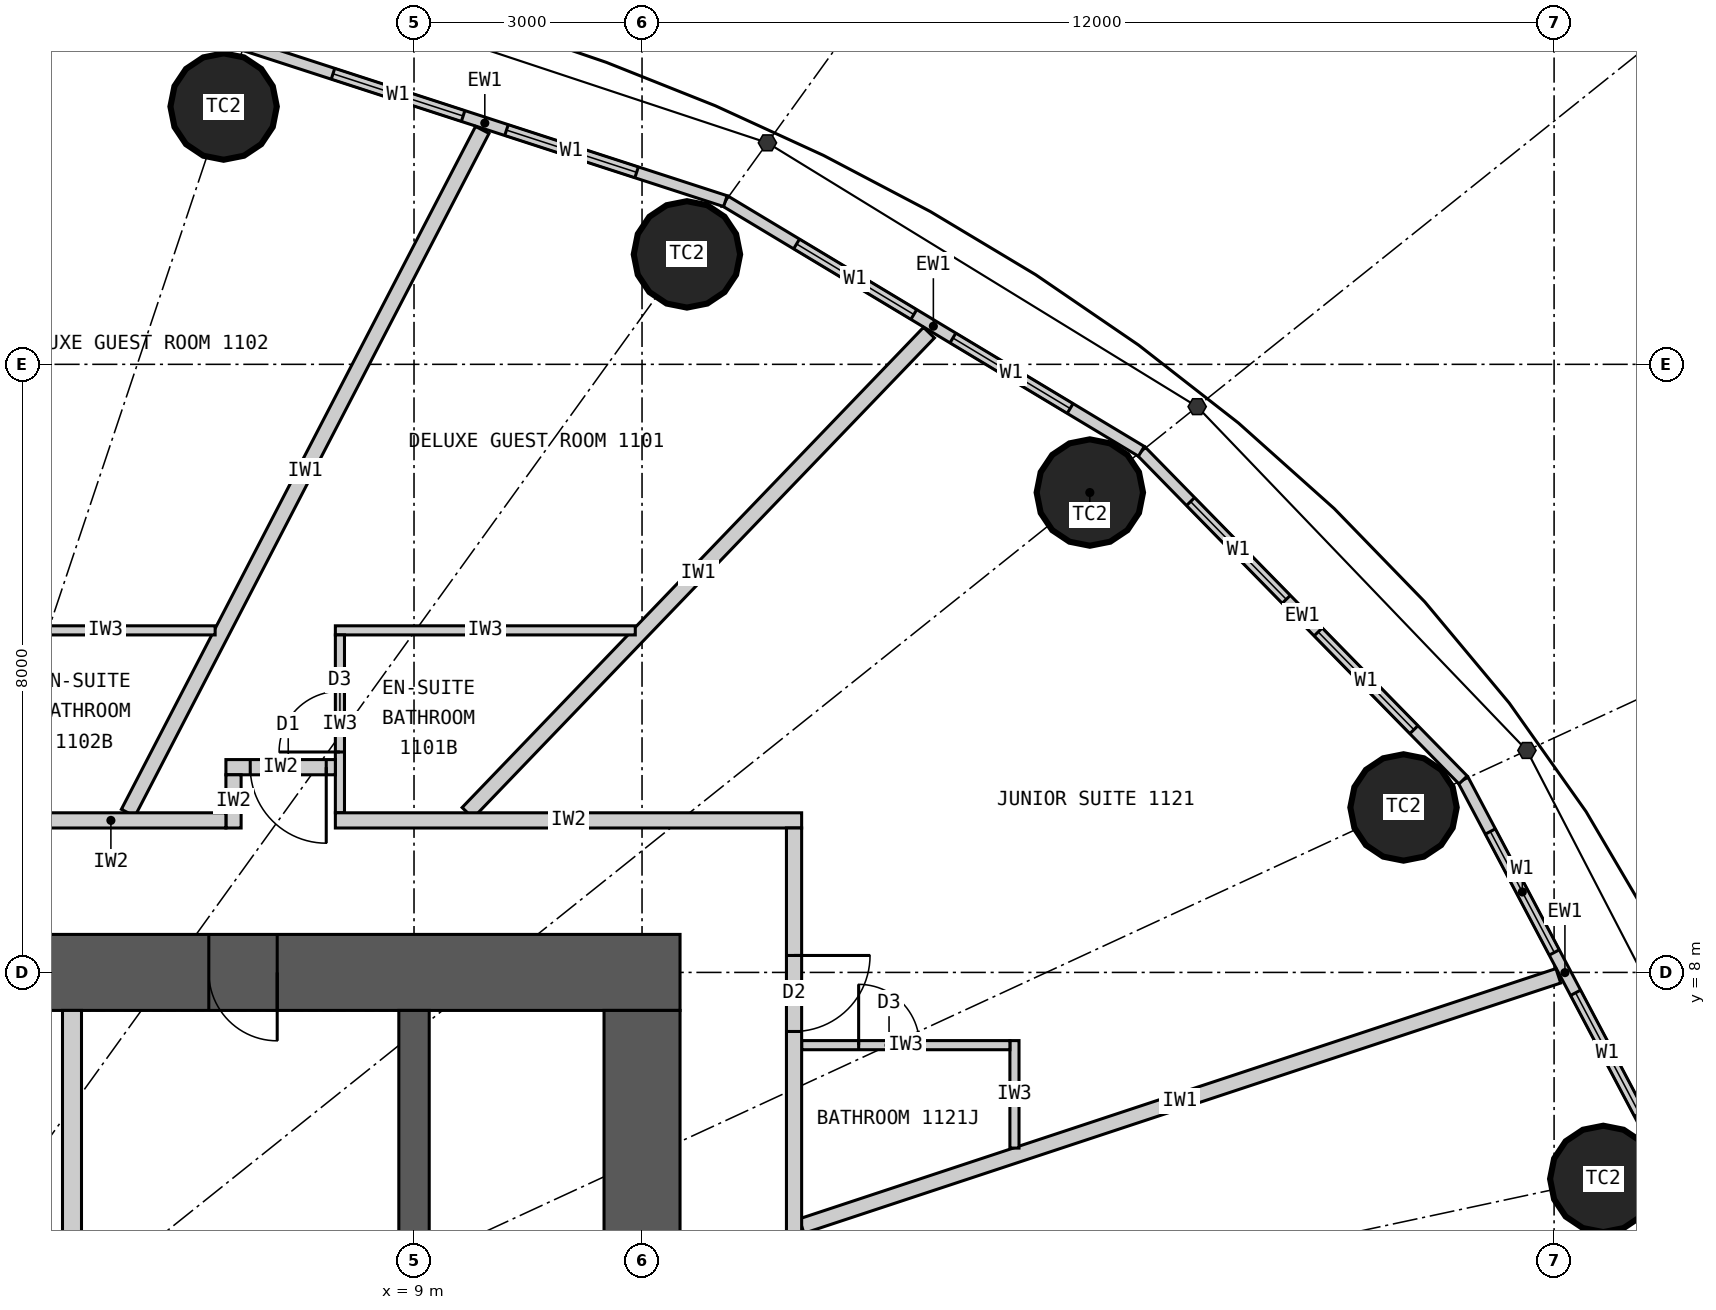
"""IFC4 building model, lengths in metres.
Left out: names, types, materials, properties, quantities, classifications, styles, units other than length and angle.
Written with IfcOpenShell. Run it as: python <this file> out.ifc"""

import sys

from ifc_helpers import new_model, si_unit, direction, frame, frame_2d, origin, origin_2d, place, context, subcontext, project, spatial, rectangle, circle, extrude, element, fill, save


model = new_model("IFC4")
c1 = context("Model", 3, precision=1e-05, world=origin(), true_north=direction((0.0, 1.0)))
c2 = subcontext(c1, "Body", "Model", "MODEL_VIEW")
j1 = project(units=[si_unit("LENGTHUNIT", "METRE"), si_unit("PLANEANGLEUNIT", "RADIAN")], contexts=[c1])
p1 = place(None, origin())
s1 = spatial("IfcSite", under=j1, at=p1, CompositionType="ELEMENT")
p2 = place(p1, origin())
s2 = spatial("IfcBuilding", under=s1, at=p2, CompositionType="ELEMENT")
p3 = place(p2, frame((0.0, 0.0, 50.7)))
s3 = spatial("IfcBuildingStorey", under=s2, at=p3, CompositionType="ELEMENT", Elevation=50.7)
for number, where, z_axis, x_axis in (
    (1, (24.647, 5.283, 0.0), (0.0, 0.0, 1.0), (1.0, 0.0, 0.0)),
    (2, (22.019, 10.17, 0.0), (0.0, 0.0, 1.0), (1.0, 0.0, 0.0)),
    (3, (17.892, 14.313, 0.0), (0.0, 0.0, 1.0), (1.0, 0.0, 0.0)),
    (4, (12.591, 17.447, 0.0), (0.0, 0.0, 1.0), (1.0, 0.0, 0.0)),
    (5, (6.495, 19.391, 0.0), (0.0, 0.0, 1.0), (1.0, 0.0, 0.0)),
):
    element("IfcColumn", number, at=place(p3, frame(where, z_axis=z_axis, x_axis=x_axis)), inside=s3, PredefinedType="COLUMN", context=c2, shape_type="SweptSolid", body=[
        extrude(circle(Radius=0.7, at=origin_2d()), origin(), (0.0, 0.0, 1.0), 3.3),
    ])
p4 = place(p3, frame((-12.5, 8.0, 0.0), z_axis=(0.0, 0.0, 1.0), x_axis=(1.0, 0.0, 0.0)))
e6 = element("IfcWall", 6, at=p4, inside=s3, PredefinedType="SHEAR", context=c2, shape_type="SweptSolid", body=[
    extrude(rectangle(XDim=25.0, YDim=1.0, at=frame_2d((12.5, 0.0))), origin(), (0.0, 0.0, 1.0), 3.3),
])
p5 = place(p4, frame((11.2, 0.0, 0.0)))
e7 = element("IfcOpeningElement", 7, at=p5, cuts=e6, PredefinedType="OPENING", context=c2, shape_type="SweptSolid", body=[
    extrude(rectangle(XDim=1.2, YDim=2.2, at=frame_2d((0.6, 1.1))), frame((0.0, 0.51, 0.0), z_axis=(0.0, -1.0, 0.0), x_axis=(1.0, 0.0, 0.0)), (0.0, 0.0, 1.0), 1.02),
])
p6 = place(p4, frame((18.8, 0.0, 0.0)))
e8 = element("IfcOpeningElement", 8, at=p6, cuts=e6, PredefinedType="OPENING", context=c2, shape_type="SweptSolid", body=[
    extrude(rectangle(XDim=0.9, YDim=2.2, at=frame_2d((0.45, 1.1))), frame((0.0, 0.51, 0.0), z_axis=(0.0, -1.0, 0.0), x_axis=(1.0, 0.0, 0.0)), (0.0, 0.0, 1.0), 1.02),
])
p7 = place(p3, frame((12.0, -7.5, 0.0), z_axis=(0.0, 0.0, 1.0), x_axis=(0.0, 1.0, 0.0)))
e9 = element("IfcWall", 9, at=p7, inside=s3, PredefinedType="SHEAR", context=c2, shape_type="SweptSolid", body=[
    extrude(rectangle(XDim=15.0, YDim=1.0, at=frame_2d((7.5, 0.0))), origin(), (0.0, 0.0, 1.0), 3.3),
])
p8 = place(p7, frame((6.6, 0.0, 0.0)))
e10 = element("IfcOpeningElement", 10, at=p8, cuts=e9, PredefinedType="OPENING", context=c2, shape_type="SweptSolid", body=[
    extrude(rectangle(XDim=1.8, YDim=2.2, at=frame_2d((0.9, 1.1))), frame((0.0, 0.51, 0.0), z_axis=(0.0, -1.0, 0.0), x_axis=(1.0, 0.0, 0.0)), (0.0, 0.0, 1.0), 1.02),
])
p9 = place(p3, frame((9.0, 4.5, 0.0), z_axis=(0.0, 0.0, 1.0), x_axis=(0.0, 1.0, 0.0)))
e11 = element("IfcWall", 11, at=p9, inside=s3, PredefinedType="SHEAR", context=c2, shape_type="SweptSolid", body=[
    extrude(rectangle(XDim=3.0, YDim=0.4, at=frame_2d((1.5, 0.0))), origin(), (0.0, 0.0, 1.0), 3.3),
])
p10 = place(p3, frame((4.5, 4.5, 0.0), z_axis=(0.0, 0.0, 1.0), x_axis=(0.0, 1.0, 0.0)))
e12 = element("IfcWall", 12, at=p10, inside=s3, PredefinedType="PARTITIONING", context=c2, shape_type="SweptSolid", body=[
    extrude(rectangle(XDim=3.0, YDim=0.25, at=frame_2d((1.5, 0.0))), origin(), (0.0, 0.0, 1.0), 3.3),
])
p11 = place(p3, frame((25.482, 5.462, 0.0), z_axis=(0.0, 0.0, 1.0), x_axis=(-0.467296867008, 0.884100468321, 0.0)))
e13 = element("IfcWall", 13, at=p11, inside=s3, PredefinedType="ELEMENTEDWALL", context=c2, shape_type="SweptSolid", body=[
    extrude(rectangle(XDim=5.734, YDim=0.15, at=frame_2d((2.867, 0.0))), origin(), (0.0, 0.0, 1.0), 3.12),
])
p12 = place(p11, frame((0.767, 0.0, 0.9)))
e14 = element("IfcOpeningElement", 14, at=p12, cuts=e13, PredefinedType="OPENING", context=c2, shape_type="SweptSolid", body=[
    extrude(rectangle(XDim=1.8, YDim=1.9, at=frame_2d((0.9, 0.95))), frame((0.0, 0.085, 0.0), z_axis=(0.0, -1.0, 0.0), x_axis=(1.0, 0.0, 0.0)), (0.0, 0.0, 1.0), 0.17),
])
p13 = place(p11, frame((3.167, 0.0, 0.9)))
e15 = element("IfcOpeningElement", 15, at=p13, cuts=e13, PredefinedType="OPENING", context=c2, shape_type="SweptSolid", body=[
    extrude(rectangle(XDim=1.8, YDim=1.9, at=frame_2d((0.9, 0.95))), frame((0.0, 0.085, 0.0), z_axis=(0.0, -1.0, 0.0), x_axis=(1.0, 0.0, 0.0)), (0.0, 0.0, 1.0), 0.17),
])
p14 = place(p3, frame((22.803, 10.532, 0.0), z_axis=(0.0, 0.0, 1.0), x_axis=(-0.699602905915, 0.714531856557, 0.0)))
e16 = element("IfcWall", 16, at=p14, inside=s3, PredefinedType="ELEMENTEDWALL", context=c2, shape_type="SweptSolid", body=[
    extrude(rectangle(XDim=6.051, YDim=0.15, at=frame_2d((3.025, 0.0))), origin(), (0.0, 0.0, 1.0), 3.12),
])
p15 = place(p14, frame((0.926, 0.0, 0.9)))
e17 = element("IfcOpeningElement", 17, at=p15, cuts=e16, PredefinedType="OPENING", context=c2, shape_type="SweptSolid", body=[
    extrude(rectangle(XDim=1.8, YDim=1.9, at=frame_2d((0.9, 0.95))), frame((0.0, 0.085, 0.0), z_axis=(0.0, -1.0, 0.0), x_axis=(1.0, 0.0, 0.0)), (0.0, 0.0, 1.0), 0.17),
])
p16 = place(p14, frame((3.325, 0.0, 0.9)))
e18 = element("IfcOpeningElement", 18, at=p16, cuts=e16, PredefinedType="OPENING", context=c2, shape_type="SweptSolid", body=[
    extrude(rectangle(XDim=1.8, YDim=1.9, at=frame_2d((0.9, 0.95))), frame((0.0, 0.085, 0.0), z_axis=(0.0, -1.0, 0.0), x_axis=(1.0, 0.0, 0.0)), (0.0, 0.0, 1.0), 0.17),
])
p17 = place(p3, frame((18.57, 14.856, 0.0), z_axis=(0.0, 0.0, 1.0), x_axis=(-0.856983180864, 0.515344377787, 0.0)))
e19 = element("IfcWall", 19, at=p17, inside=s3, PredefinedType="ELEMENTEDWALL", context=c2, shape_type="SweptSolid", body=[
    extrude(rectangle(XDim=6.386, YDim=0.15, at=frame_2d((3.193, 0.0))), origin(), (0.0, 0.0, 1.0), 3.12),
])
p18 = place(p17, frame((1.093, 0.0, 0.9)))
e20 = element("IfcOpeningElement", 20, at=p18, cuts=e19, PredefinedType="OPENING", context=c2, shape_type="SweptSolid", body=[
    extrude(rectangle(XDim=1.8, YDim=1.9, at=frame_2d((0.9, 0.95))), frame((0.0, 0.085, 0.0), z_axis=(0.0, -1.0, 0.0), x_axis=(1.0, 0.0, 0.0)), (0.0, 0.0, 1.0), 0.17),
])
p19 = place(p17, frame((3.493, 0.0, 0.9)))
e21 = element("IfcOpeningElement", 21, at=p19, cuts=e19, PredefinedType="OPENING", context=c2, shape_type="SweptSolid", body=[
    extrude(rectangle(XDim=1.8, YDim=1.9, at=frame_2d((0.9, 0.95))), frame((0.0, 0.085, 0.0), z_axis=(0.0, -1.0, 0.0), x_axis=(1.0, 0.0, 0.0)), (0.0, 0.0, 1.0), 0.17),
])
p20 = place(p3, frame((13.096, 18.147, 0.0), z_axis=(0.0, 0.0, 1.0), x_axis=(-0.951137534625, 0.308767534285, 0.0)))
e22 = element("IfcWall", 22, at=p20, inside=s3, PredefinedType="ELEMENTEDWALL", context=c2, shape_type="SweptSolid", body=[
    extrude(rectangle(XDim=6.655, YDim=0.15, at=frame_2d((3.328, 0.0))), origin(), (0.0, 0.0, 1.0), 3.12),
])
p21 = place(p20, frame((1.228, 0.0, 0.9)))
e23 = element("IfcOpeningElement", 23, at=p21, cuts=e22, PredefinedType="OPENING", context=c2, shape_type="SweptSolid", body=[
    extrude(rectangle(XDim=1.8, YDim=1.9, at=frame_2d((0.9, 0.95))), frame((0.0, 0.085, 0.0), z_axis=(0.0, -1.0, 0.0), x_axis=(1.0, 0.0, 0.0)), (0.0, 0.0, 1.0), 0.17),
])
p22 = place(p20, frame((3.628, 0.0, 0.9)))
e24 = element("IfcOpeningElement", 24, at=p22, cuts=e22, PredefinedType="OPENING", context=c2, shape_type="SweptSolid", body=[
    extrude(rectangle(XDim=1.8, YDim=1.9, at=frame_2d((0.9, 0.95))), frame((0.0, 0.085, 0.0), z_axis=(0.0, -1.0, 0.0), x_axis=(1.0, 0.0, 0.0)), (0.0, 0.0, 1.0), 0.17),
])
p23 = place(p3, frame((14.1, 4.663, 0.0), z_axis=(0.0, 0.0, 1.0), x_axis=(0.949432655039, 0.31397075269, 0.0)))
e25 = element("IfcWall", 25, at=p23, inside=s3, PredefinedType="PARTITIONING", context=c2, shape_type="SweptSolid", body=[
    extrude(rectangle(XDim=10.486, YDim=0.2, at=frame_2d((5.243, 0.0))), origin(), (0.0, 0.0, 1.0), 3.12),
])
p24 = place(p3, frame((9.705, 10.1, 0.0), z_axis=(0.0, 0.0, 1.0), x_axis=(0.692879226267, 0.721053658064, 0.0)))
e26 = element("IfcWall", 26, at=p24, inside=s3, PredefinedType="PARTITIONING", context=c2, shape_type="SweptSolid", body=[
    extrude(rectangle(XDim=8.761, YDim=0.2, at=frame_2d((4.38, 0.0))), origin(), (0.0, 0.0, 1.0), 3.12),
])
p25 = place(p3, frame((5.239, 10.1, 0.0), z_axis=(0.0, 0.0, 1.0), x_axis=(0.460422783389, 0.887699758103, 0.0)))
e27 = element("IfcWall", 27, at=p25, inside=s3, PredefinedType="PARTITIONING", context=c2, shape_type="SweptSolid", body=[
    extrude(rectangle(XDim=10.12, YDim=0.2, at=frame_2d((5.06, 0.0))), origin(), (0.0, 0.0, 1.0), 3.12),
])
p26 = place(p3, frame((11.911, 12.5, 0.0), z_axis=(0.0, 0.0, 1.0), x_axis=(-1.0, 0.0, 0.0)))
e28 = element("IfcWall", 28, at=p26, inside=s3, PredefinedType="PARTITIONING", context=c2, shape_type="SweptSolid", body=[
    extrude(rectangle(XDim=3.946, YDim=0.12, at=frame_2d((1.973, 0.0))), origin(), (0.0, 0.0, 1.0), 3.12),
])
p27 = place(p3, frame((8.025, 10.1, 0.0), z_axis=(0.0, 0.0, 1.0), x_axis=(0.0, 1.0, 0.0)))
e29 = element("IfcWall", 29, at=p27, inside=s3, PredefinedType="PARTITIONING", context=c2, shape_type="SweptSolid", body=[
    extrude(rectangle(XDim=2.34, YDim=0.12, at=frame_2d((1.17, 0.0))), origin(), (0.0, 0.0, 1.0), 3.12),
])
p28 = place(p27, frame((0.8, 0.0, 0.0)))
e30 = element("IfcOpeningElement", 30, at=p28, cuts=e29, PredefinedType="OPENING", context=c2, shape_type="SweptSolid", body=[
    extrude(rectangle(XDim=0.8, YDim=2.1, at=frame_2d((0.4, 1.05))), frame((0.0, 0.07, 0.0), z_axis=(0.0, -1.0, 0.0), x_axis=(1.0, 0.0, 0.0)), (0.0, 0.0, 1.0), 0.14),
])
p29 = place(p3, frame((6.383, 12.5, 0.0), z_axis=(0.0, 0.0, 1.0), x_axis=(-1.0, 0.0, 0.0)))
e31 = element("IfcWall", 31, at=p29, inside=s3, PredefinedType="PARTITIONING", context=c2, shape_type="SweptSolid", body=[
    extrude(rectangle(XDim=2.885, YDim=0.12, at=frame_2d((1.442, 0.0))), origin(), (0.0, 0.0, 1.0), 3.12),
])
p30 = place(p3, frame((16.9, 5.689, 0.0), z_axis=(0.0, 0.0, 1.0), x_axis=(0.0, 1.0, 0.0)))
e32 = element("IfcWall", 32, at=p30, inside=s3, PredefinedType="PARTITIONING", context=c2, shape_type="SweptSolid", body=[
    extrude(rectangle(XDim=1.414, YDim=0.12, at=frame_2d((0.707, 0.0))), origin(), (0.0, 0.0, 1.0), 3.12),
])
p31 = place(p3, frame((14.1, 7.043, 0.0), z_axis=(0.0, 0.0, 1.0), x_axis=(1.0, 0.0, 0.0)))
e33 = element("IfcWall", 33, at=p31, inside=s3, PredefinedType="PARTITIONING", context=c2, shape_type="SweptSolid", body=[
    extrude(rectangle(XDim=2.74, YDim=0.12, at=frame_2d((1.37, 0.0))), origin(), (0.0, 0.0, 1.0), 3.12),
])
p32 = place(p31, frame((0.75, 0.0, 0.0)))
e34 = element("IfcOpeningElement", 34, at=p32, cuts=e33, PredefinedType="OPENING", context=c2, shape_type="SweptSolid", body=[
    extrude(rectangle(XDim=0.8, YDim=2.1, at=frame_2d((0.4, 1.05))), frame((0.0, 0.07, 0.0), z_axis=(0.0, -1.0, 0.0), x_axis=(1.0, 0.0, 0.0)), (0.0, 0.0, 1.0), 0.14),
])
p33 = place(p3, frame((6.525, 10.7, 0.0), z_axis=(0.0, 0.0, 1.0), x_axis=(1.0, 0.0, 0.0)))
e35 = element("IfcWall", 35, at=p33, inside=s3, PredefinedType="PARTITIONING", context=c2, shape_type="SweptSolid", body=[
    extrude(rectangle(XDim=1.44, YDim=0.2, at=frame_2d((0.72, 0.0))), origin(), (0.0, 0.0, 1.0), 3.12),
])
p34 = place(p33, frame((0.32, 0.0, 0.0)))
e36 = element("IfcOpeningElement", 36, at=p34, cuts=e35, PredefinedType="OPENING", context=c2, shape_type="SweptSolid", body=[
    extrude(rectangle(XDim=1.0, YDim=2.2, at=frame_2d((0.5, 1.1))), frame((0.0, 0.11, 0.0), z_axis=(0.0, -1.0, 0.0), x_axis=(1.0, 0.0, 0.0)), (0.0, 0.0, 1.0), 0.22),
])
p35 = place(p3, frame((6.625, 9.9, 0.0), z_axis=(0.0, 0.0, 1.0), x_axis=(0.0, 1.0, 0.0)))
e37 = element("IfcWall", 37, at=p35, inside=s3, PredefinedType="PARTITIONING", context=c2, shape_type="SweptSolid", body=[
    extrude(rectangle(XDim=0.7, YDim=0.2, at=frame_2d((0.35, 0.0))), origin(), (0.0, 0.0, 1.0), 3.12),
])
p36 = place(p3, frame((3.499, 10.0, 0.0), z_axis=(0.0, 0.0, 1.0), x_axis=(1.0, 0.0, 0.0)))
e38 = element("IfcWall", 38, at=p36, inside=s3, PredefinedType="PARTITIONING", context=c2, shape_type="SweptSolid", body=[
    extrude(rectangle(XDim=3.027, YDim=0.2, at=frame_2d((1.513, 0.0))), origin(), (0.0, 0.0, 1.0), 3.12),
])
p37 = place(p3, frame((7.965, 10.0, 0.0), z_axis=(0.0, 0.0, 1.0), x_axis=(1.0, 0.0, 0.0)))
e39 = element("IfcWall", 39, at=p37, inside=s3, PredefinedType="PARTITIONING", context=c2, shape_type="SweptSolid", body=[
    extrude(rectangle(XDim=6.135, YDim=0.2, at=frame_2d((3.067, 0.0))), origin(), (0.0, 0.0, 1.0), 3.12),
])
p38 = place(p3, frame((14.0, -5.459, 0.0), z_axis=(0.0, 0.0, 1.0), x_axis=(0.0, 1.0, 0.0)))
e40 = element("IfcWall", 40, at=p38, inside=s3, PredefinedType="PARTITIONING", context=c2, shape_type="SweptSolid", body=[
    extrude(rectangle(XDim=15.359, YDim=0.2, at=frame_2d((7.679, 0.0))), origin(), (0.0, 0.0, 1.0), 3.12),
])
p39 = place(p38, frame((2.656, 0.0, 0.0)))
e41 = element("IfcOpeningElement", 41, at=p39, cuts=e40, PredefinedType="OPENING", context=c2, shape_type="SweptSolid", body=[
    extrude(rectangle(XDim=1.0, YDim=2.2, at=frame_2d((0.5, 1.1))), frame((0.0, 0.11, 0.0), z_axis=(0.0, -1.0, 0.0), x_axis=(1.0, 0.0, 0.0)), (0.0, 0.0, 1.0), 0.22),
])
p40 = place(p38, frame((6.537, 0.0, 0.0)))
e42 = element("IfcOpeningElement", 42, at=p40, cuts=e40, PredefinedType="OPENING", context=c2, shape_type="SweptSolid", body=[
    extrude(rectangle(XDim=1.0, YDim=2.2, at=frame_2d((0.5, 1.1))), frame((0.0, 0.11, 0.0), z_axis=(0.0, -1.0, 0.0), x_axis=(1.0, 0.0, 0.0)), (0.0, 0.0, 1.0), 0.22),
])
p41 = place(p38, frame((12.682, 0.0, 0.0)))
e43 = element("IfcOpeningElement", 43, at=p41, cuts=e40, PredefinedType="OPENING", context=c2, shape_type="SweptSolid", body=[
    extrude(rectangle(XDim=1.0, YDim=2.2, at=frame_2d((0.5, 1.1))), frame((0.0, 0.11, 0.0), z_axis=(0.0, -1.0, 0.0), x_axis=(1.0, 0.0, 0.0)), (0.0, 0.0, 1.0), 0.22),
])
p42 = place(p12, origin())
e44 = element("IfcWindow", 44, at=p42, inside=s3, PartitioningType="SINGLE_PANEL", PredefinedType="WINDOW", context=c2, shape_type="SweptSolid", body=[
    extrude(rectangle(XDim=1.8, YDim=1.9, at=frame_2d((0.9, 0.95))), frame((0.0, 0.03, 0.0), z_axis=(0.0, -1.0, 0.0), x_axis=(1.0, 0.0, 0.0)), (0.0, 0.0, 1.0), 0.06),
])
fill(e14, e44)
p43 = place(p13, origin())
e45 = element("IfcWindow", 45, at=p43, inside=s3, PartitioningType="SINGLE_PANEL", PredefinedType="WINDOW", context=c2, shape_type="SweptSolid", body=[
    extrude(rectangle(XDim=1.8, YDim=1.9, at=frame_2d((0.9, 0.95))), frame((0.0, 0.03, 0.0), z_axis=(0.0, -1.0, 0.0), x_axis=(1.0, 0.0, 0.0)), (0.0, 0.0, 1.0), 0.06),
])
fill(e15, e45)
p44 = place(p15, origin())
e46 = element("IfcWindow", 46, at=p44, inside=s3, PartitioningType="SINGLE_PANEL", PredefinedType="WINDOW", context=c2, shape_type="SweptSolid", body=[
    extrude(rectangle(XDim=1.8, YDim=1.9, at=frame_2d((0.9, 0.95))), frame((0.0, 0.03, 0.0), z_axis=(0.0, -1.0, 0.0), x_axis=(1.0, 0.0, 0.0)), (0.0, 0.0, 1.0), 0.06),
])
fill(e17, e46)
p45 = place(p16, origin())
e47 = element("IfcWindow", 47, at=p45, inside=s3, PartitioningType="SINGLE_PANEL", PredefinedType="WINDOW", context=c2, shape_type="SweptSolid", body=[
    extrude(rectangle(XDim=1.8, YDim=1.9, at=frame_2d((0.9, 0.95))), frame((0.0, 0.03, 0.0), z_axis=(0.0, -1.0, 0.0), x_axis=(1.0, 0.0, 0.0)), (0.0, 0.0, 1.0), 0.06),
])
fill(e18, e47)
p46 = place(p18, origin())
e48 = element("IfcWindow", 48, at=p46, inside=s3, PartitioningType="SINGLE_PANEL", PredefinedType="WINDOW", context=c2, shape_type="SweptSolid", body=[
    extrude(rectangle(XDim=1.8, YDim=1.9, at=frame_2d((0.9, 0.95))), frame((0.0, 0.03, 0.0), z_axis=(0.0, -1.0, 0.0), x_axis=(1.0, 0.0, 0.0)), (0.0, 0.0, 1.0), 0.06),
])
fill(e20, e48)
p47 = place(p19, origin())
e49 = element("IfcWindow", 49, at=p47, inside=s3, PartitioningType="SINGLE_PANEL", PredefinedType="WINDOW", context=c2, shape_type="SweptSolid", body=[
    extrude(rectangle(XDim=1.8, YDim=1.9, at=frame_2d((0.9, 0.95))), frame((0.0, 0.03, 0.0), z_axis=(0.0, -1.0, 0.0), x_axis=(1.0, 0.0, 0.0)), (0.0, 0.0, 1.0), 0.06),
])
fill(e21, e49)
p48 = place(p21, origin())
e50 = element("IfcWindow", 50, at=p48, inside=s3, PartitioningType="SINGLE_PANEL", PredefinedType="WINDOW", context=c2, shape_type="SweptSolid", body=[
    extrude(rectangle(XDim=1.8, YDim=1.9, at=frame_2d((0.9, 0.95))), frame((0.0, 0.03, 0.0), z_axis=(0.0, -1.0, 0.0), x_axis=(1.0, 0.0, 0.0)), (0.0, 0.0, 1.0), 0.06),
])
fill(e23, e50)
p49 = place(p22, origin())
e51 = element("IfcWindow", 51, at=p49, inside=s3, PartitioningType="SINGLE_PANEL", PredefinedType="WINDOW", context=c2, shape_type="SweptSolid", body=[
    extrude(rectangle(XDim=1.8, YDim=1.9, at=frame_2d((0.9, 0.95))), frame((0.0, 0.03, 0.0), z_axis=(0.0, -1.0, 0.0), x_axis=(1.0, 0.0, 0.0)), (0.0, 0.0, 1.0), 0.06),
])
fill(e24, e51)
p50 = place(p28, origin())
e52 = element("IfcDoor", 52, at=p50, inside=s3, OperationType="SINGLE_SWING_LEFT", PredefinedType="DOOR", context=c2, shape_type="SweptSolid", body=[
    extrude(rectangle(XDim=0.8, YDim=2.1, at=frame_2d((0.4, 1.05))), frame((0.0, 0.025, 0.0), z_axis=(0.0, -1.0, 0.0), x_axis=(1.0, 0.0, 0.0)), (0.0, 0.0, 1.0), 0.05),
])
fill(e30, e52)
p51 = place(p34, origin())
e53 = element("IfcDoor", 53, at=p51, inside=s3, OperationType="SINGLE_SWING_RIGHT", PredefinedType="DOOR", context=c2, shape_type="SweptSolid", body=[
    extrude(rectangle(XDim=1.0, YDim=2.2, at=frame_2d((0.5, 1.1))), frame((0.0, 0.025, 0.0), z_axis=(0.0, -1.0, 0.0), x_axis=(1.0, 0.0, 0.0)), (0.0, 0.0, 1.0), 0.05),
])
fill(e36, e53)
p52 = place(p32, origin())
e54 = element("IfcDoor", 54, at=p52, inside=s3, OperationType="SINGLE_SWING_LEFT", PredefinedType="DOOR", context=c2, shape_type="SweptSolid", body=[
    extrude(rectangle(XDim=0.8, YDim=2.1, at=frame_2d((0.4, 1.05))), frame((0.0, 0.025, 0.0), z_axis=(0.0, -1.0, 0.0), x_axis=(1.0, 0.0, 0.0)), (0.0, 0.0, 1.0), 0.05),
])
fill(e34, e54)
p53 = place(p41, origin())
e55 = element("IfcDoor", 55, at=p53, inside=s3, OperationType="SINGLE_SWING_RIGHT", PredefinedType="DOOR", context=c2, shape_type="SweptSolid", body=[
    extrude(rectangle(XDim=1.0, YDim=2.2, at=frame_2d((0.5, 1.1))), frame((0.0, 0.025, 0.0), z_axis=(0.0, -1.0, 0.0), x_axis=(1.0, 0.0, 0.0)), (0.0, 0.0, 1.0), 0.05),
])
fill(e43, e55)
p54 = place(p6, origin())
e56 = element("IfcDoor", 56, at=p54, inside=s3, OperationType="SINGLE_SWING_RIGHT", PredefinedType="DOOR", context=c2, shape_type="SweptSolid", body=[
    extrude(rectangle(XDim=0.9, YDim=2.2, at=frame_2d((0.45, 1.1))), frame((0.0, 0.025, 0.0), z_axis=(0.0, -1.0, 0.0), x_axis=(1.0, 0.0, 0.0)), (0.0, 0.0, 1.0), 0.05),
])
fill(e8, e56)
save(model, sys.argv[1])
